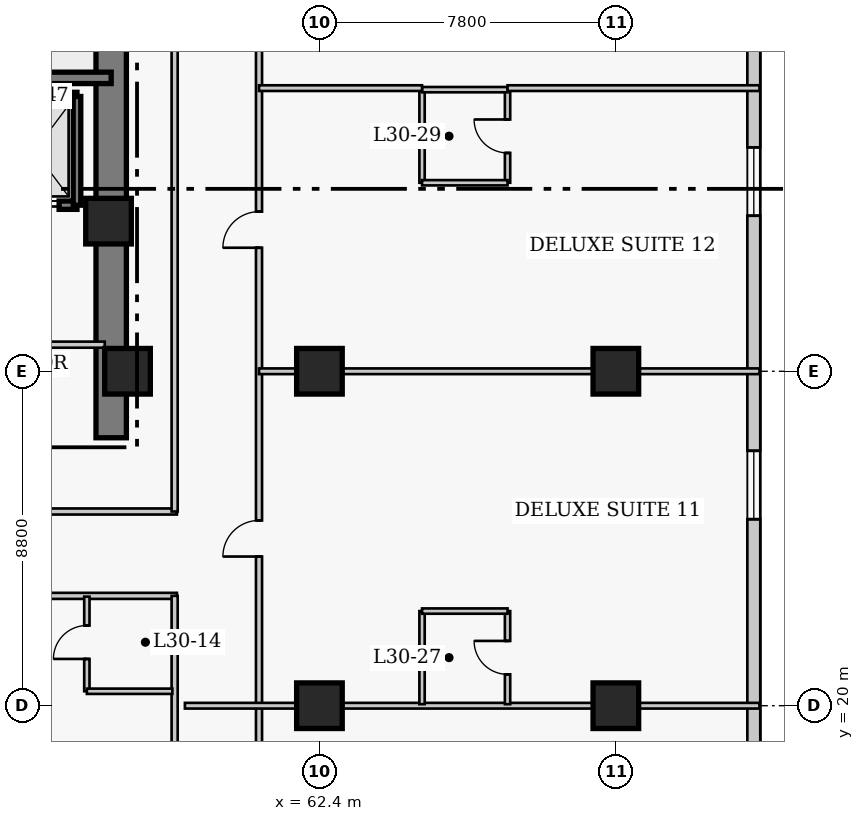
"""IFC4 building model, lengths in metres.
Left out: names, types, materials, properties, quantities, classifications, styles, units other than length and angle.
Written with IfcOpenShell. Run it as: python <this file> out.ifc"""

import sys

from ifc_helpers import new_model, si_unit, direction, frame, frame_2d, origin, origin_2d, place, context, subcontext, project, spatial, rectangle, extrude, element, fill, save


model = new_model("IFC4")
c1 = context("Model", 3, precision=1e-05, world=origin(), true_north=direction((0.0, 1.0)))
c2 = subcontext(c1, "Body", "Model", "MODEL_VIEW")
j1 = project(units=[si_unit("LENGTHUNIT", "METRE"), si_unit("PLANEANGLEUNIT", "RADIAN")], contexts=[c1])
p1 = place(None, origin())
s1 = spatial("IfcSite", under=j1, at=p1, CompositionType="ELEMENT")
p2 = place(p1, origin())
s2 = spatial("IfcBuilding", under=s1, at=p2, CompositionType="ELEMENT")
p3 = place(p2, frame((0.0, 0.0, 122.2)))
s3 = spatial("IfcBuildingStorey", under=s2, at=p3, CompositionType="ELEMENT", Elevation=122.2)
p4 = place(p3, frame((56.92, 27.05, 0.0), z_axis=(0.0, 0.0, 1.0), x_axis=(0.0, 1.0, 0.0)))
e1 = element("IfcWall", 1, at=p4, inside=s3, PredefinedType="SHEAR", context=c2, shape_type="SweptSolid", body=[
    extrude(rectangle(XDim=13.67, YDim=0.8, at=frame_2d((6.835, 0.0))), origin(), (0.0, 0.0, 1.0), 3.8),
])
p5 = place(p3, frame((48.45, 36.52, 0.0), z_axis=(0.0, 0.0, 1.0), x_axis=(1.0, 0.0, 0.0)))
e2 = element("IfcWall", 2, at=p5, inside=s3, PredefinedType="SHEAR", context=c2, shape_type="SweptSolid", body=[
    extrude(rectangle(XDim=8.47, YDim=0.3, at=frame_2d((4.235, 0.0))), origin(), (0.0, 0.0, 1.0), 3.8),
])
for number, where, z_axis, x_axis in (
    (3, (62.4, 20.0, 0.0), (0.0, 0.0, 1.0), (1.0, 0.0, 0.0)),
    (4, (62.4, 28.8, 0.0), (0.0, 0.0, 1.0), (1.0, 0.0, 0.0)),
    (5, (70.2, 20.0, 0.0), (0.0, 0.0, 1.0), (1.0, 0.0, 0.0)),
    (6, (70.2, 28.8, 0.0), (0.0, 0.0, 1.0), (1.0, 0.0, 0.0)),
    (7, (57.35, 28.8, 0.0), (0.0, 0.0, 1.0), (1.0, 0.0, 0.0)),
    (8, (56.85, 32.75, 0.0), (0.0, 0.0, 1.0), (1.0, 0.0, 0.0)),
):
    element("IfcColumn", number, at=place(p3, frame(where, z_axis=z_axis, x_axis=x_axis)), inside=s3, PredefinedType="COLUMN", context=c2, shape_type="SweptSolid", body=[
        extrude(rectangle(XDim=1.2, YDim=1.2, at=origin_2d()), origin(), (0.0, 0.0, 1.0), 3.8),
    ])
p6 = place(p3, frame((73.83, 13.83, 0.0), z_axis=(0.0, 0.0, 1.0), x_axis=(0.0, 1.0, 0.0)))
e9 = element("IfcWall", 9, at=p6, inside=s3, PredefinedType="SOLIDWALL", context=c2, shape_type="SweptSolid", body=[
    extrude(rectangle(XDim=31.94, YDim=0.34, at=frame_2d((15.97, 0.0))), origin(), (0.0, 0.0, 1.0), 3.54),
])
p7 = place(p6, frame((3.093, 0.0, 0.85)))
e10 = element("IfcOpeningElement", 10, at=p7, cuts=e9, PredefinedType="OPENING", context=c2, shape_type="SweptSolid", body=[
    extrude(rectangle(XDim=1.8, YDim=1.8, at=frame_2d((0.9, 0.9))), frame((0.0, 0.18, 0.0), z_axis=(0.0, -1.0, 0.0), x_axis=(1.0, 0.0, 0.0)), (0.0, 0.0, 1.0), 0.36),
])
p8 = place(p6, frame((11.077, 0.0, 0.85)))
e11 = element("IfcOpeningElement", 11, at=p8, cuts=e9, PredefinedType="OPENING", context=c2, shape_type="SweptSolid", body=[
    extrude(rectangle(XDim=1.8, YDim=1.8, at=frame_2d((0.9, 0.9))), frame((0.0, 0.18, 0.0), z_axis=(0.0, -1.0, 0.0), x_axis=(1.0, 0.0, 0.0)), (0.0, 0.0, 1.0), 0.36),
])
p9 = place(p6, frame((19.062, 0.0, 0.85)))
e12 = element("IfcOpeningElement", 12, at=p9, cuts=e9, PredefinedType="OPENING", context=c2, shape_type="SweptSolid", body=[
    extrude(rectangle(XDim=1.8, YDim=1.8, at=frame_2d((0.9, 0.9))), frame((0.0, 0.18, 0.0), z_axis=(0.0, -1.0, 0.0), x_axis=(1.0, 0.0, 0.0)), (0.0, 0.0, 1.0), 0.36),
])
p10 = place(p6, frame((27.048, 0.0, 0.85)))
e13 = element("IfcOpeningElement", 13, at=p10, cuts=e9, PredefinedType="OPENING", context=c2, shape_type="SweptSolid", body=[
    extrude(rectangle(XDim=1.8, YDim=1.8, at=frame_2d((0.9, 0.9))), frame((0.0, 0.18, 0.0), z_axis=(0.0, -1.0, 0.0), x_axis=(1.0, 0.0, 0.0)), (0.0, 0.0, 1.0), 0.36),
])
p11 = place(p3, frame((53.6, 36.03, 0.0), z_axis=(0.0, 0.0, 1.0), x_axis=(1.0, 0.0, 0.0)))
e14 = element("IfcWall", 14, at=p11, inside=s3, PredefinedType="SHEAR", context=c2, shape_type="SweptSolid", body=[
    extrude(rectangle(XDim=2.42, YDim=0.22, at=frame_2d((1.21, 0.0))), origin(), (0.0, 0.0, 1.0), 3.8),
])
p12 = place(p3, frame((53.6, 33.17, 0.0), z_axis=(0.0, 0.0, 1.0), x_axis=(1.0, 0.0, 0.0)))
e15 = element("IfcWall", 15, at=p12, inside=s3, PredefinedType="SHEAR", context=c2, shape_type="SweptSolid", body=[
    extrude(rectangle(XDim=2.42, YDim=0.22, at=frame_2d((1.21, 0.0))), origin(), (0.0, 0.0, 1.0), 3.8),
])
p13 = place(p12, frame((0.65, 0.0, 0.0)))
e16 = element("IfcOpeningElement", 16, at=p13, cuts=e15, PredefinedType="OPENING", context=c2, shape_type="SweptSolid", body=[
    extrude(rectangle(XDim=1.3, YDim=2.15, at=frame_2d((0.65, 1.075))), frame((0.0, 0.12, 0.0), z_axis=(0.0, -1.0, 0.0), x_axis=(1.0, 0.0, 0.0)), (0.0, 0.0, 1.0), 0.24),
])
p14 = place(p3, frame((56.02, 33.17, 0.0), z_axis=(0.0, 0.0, 1.0), x_axis=(0.0, 1.0, 0.0)))
e17 = element("IfcWall", 17, at=p14, inside=s3, PredefinedType="SHEAR", context=c2, shape_type="SweptSolid", body=[
    extrude(rectangle(XDim=2.86, YDim=0.2, at=frame_2d((1.43, 0.0))), origin(), (0.0, 0.0, 1.0), 3.8),
])
p15 = place(p3, frame((51.12, 29.5, 0.0), z_axis=(0.0, 0.0, 1.0), x_axis=(1.0, 0.0, 0.0)))
e18 = element("IfcWall", 18, at=p15, inside=s3, PredefinedType="PARTITIONING", context=c2, shape_type="SweptSolid", body=[
    extrude(rectangle(XDim=5.63, YDim=0.16, at=frame_2d((2.815, 0.0))), origin(), (0.0, 0.0, 1.0), 3.54),
])
p16 = place(p3, frame((35.85, 25.11, 0.0), z_axis=(0.0, 0.0, 1.0), x_axis=(1.0, 0.0, 0.0)))
e19 = element("IfcWall", 19, at=p16, inside=s3, PredefinedType="PARTITIONING", context=c2, shape_type="SweptSolid", body=[
    extrude(rectangle(XDim=22.8, YDim=0.16, at=frame_2d((11.4, 0.0))), origin(), (0.0, 0.0, 1.0), 3.54),
])
p17 = place(p3, frame((35.8, 22.89, 0.0), z_axis=(0.0, 0.0, 1.0), x_axis=(1.0, 0.0, 0.0)))
e20 = element("IfcWall", 20, at=p17, inside=s3, PredefinedType="PARTITIONING", context=c2, shape_type="SweptSolid", body=[
    extrude(rectangle(XDim=22.85, YDim=0.16, at=frame_2d((11.425, 0.0))), origin(), (0.0, 0.0, 1.0), 3.54),
])
p18 = place(p17, frame((0.924, 0.0, 0.0)))
e21 = element("IfcOpeningElement", 21, at=p18, cuts=e20, PredefinedType="OPENING", context=c2, shape_type="SweptSolid", body=[
    extrude(rectangle(XDim=0.95, YDim=2.1, at=frame_2d((0.475, 1.05))), frame((0.0, 0.09, 0.0), z_axis=(0.0, -1.0, 0.0), x_axis=(1.0, 0.0, 0.0)), (0.0, 0.0, 1.0), 0.18),
])
p19 = place(p17, frame((8.046, 0.0, 0.0)))
e22 = element("IfcOpeningElement", 22, at=p19, cuts=e20, PredefinedType="OPENING", context=c2, shape_type="SweptSolid", body=[
    extrude(rectangle(XDim=1.0, YDim=2.15, at=frame_2d((0.5, 1.075))), frame((0.0, 0.09, 0.0), z_axis=(0.0, -1.0, 0.0), x_axis=(1.0, 0.0, 0.0)), (0.0, 0.0, 1.0), 0.18),
])
p20 = place(p17, frame((12.614, 0.0, 0.0)))
e23 = element("IfcOpeningElement", 23, at=p20, cuts=e20, PredefinedType="OPENING", context=c2, shape_type="SweptSolid", body=[
    extrude(rectangle(XDim=0.95, YDim=2.1, at=frame_2d((0.475, 1.05))), frame((0.0, 0.09, 0.0), z_axis=(0.0, -1.0, 0.0), x_axis=(1.0, 0.0, 0.0)), (0.0, 0.0, 1.0), 0.18),
])
p21 = place(p17, frame((18.311, 0.0, 0.0)))
e24 = element("IfcOpeningElement", 24, at=p21, cuts=e20, PredefinedType="OPENING", context=c2, shape_type="SweptSolid", body=[
    extrude(rectangle(XDim=0.95, YDim=2.1, at=frame_2d((0.475, 1.05))), frame((0.0, 0.09, 0.0), z_axis=(0.0, -1.0, 0.0), x_axis=(1.0, 0.0, 0.0)), (0.0, 0.0, 1.0), 0.18),
])
p22 = place(p3, frame((60.81, 11.85, 0.0), z_axis=(0.0, 0.0, 1.0), x_axis=(0.0, 1.0, 0.0)))
e25 = element("IfcWall", 25, at=p22, inside=s3, PredefinedType="PARTITIONING", context=c2, shape_type="SweptSolid", body=[
    extrude(rectangle(XDim=28.8, YDim=0.16, at=frame_2d((14.4, 0.0))), origin(), (0.0, 0.0, 1.0), 3.54),
])
p23 = place(p22, frame((3.6, 0.0, 0.0)))
e26 = element("IfcOpeningElement", 26, at=p23, cuts=e25, PredefinedType="OPENING", context=c2, shape_type="SweptSolid", body=[
    extrude(rectangle(XDim=0.95, YDim=2.1, at=frame_2d((0.475, 1.05))), frame((0.0, 0.09, 0.0), z_axis=(0.0, -1.0, 0.0), x_axis=(1.0, 0.0, 0.0)), (0.0, 0.0, 1.0), 0.18),
])
p24 = place(p22, frame((12.075, 0.0, 0.0)))
e27 = element("IfcOpeningElement", 27, at=p24, cuts=e25, PredefinedType="OPENING", context=c2, shape_type="SweptSolid", body=[
    extrude(rectangle(XDim=0.95, YDim=2.1, at=frame_2d((0.475, 1.05))), frame((0.0, 0.09, 0.0), z_axis=(0.0, -1.0, 0.0), x_axis=(1.0, 0.0, 0.0)), (0.0, 0.0, 1.0), 0.18),
])
p25 = place(p22, frame((20.2, 0.0, 0.0)))
e28 = element("IfcOpeningElement", 28, at=p25, cuts=e25, PredefinedType="OPENING", context=c2, shape_type="SweptSolid", body=[
    extrude(rectangle(XDim=0.95, YDim=2.1, at=frame_2d((0.475, 1.05))), frame((0.0, 0.09, 0.0), z_axis=(0.0, -1.0, 0.0), x_axis=(1.0, 0.0, 0.0)), (0.0, 0.0, 1.0), 0.18),
])
p26 = place(p22, frame((27.36, 0.0, 0.0)))
e29 = element("IfcOpeningElement", 29, at=p26, cuts=e25, PredefinedType="OPENING", context=c2, shape_type="SweptSolid", body=[
    extrude(rectangle(XDim=1.0, YDim=2.15, at=frame_2d((0.5, 1.075))), frame((0.0, 0.09, 0.0), z_axis=(0.0, -1.0, 0.0), x_axis=(1.0, 0.0, 0.0)), (0.0, 0.0, 1.0), 0.18),
])
p27 = place(p3, frame((58.59, 25.11, 0.0), z_axis=(0.0, 0.0, 1.0), x_axis=(0.0, 1.0, 0.0)))
e30 = element("IfcWall", 30, at=p27, inside=s3, PredefinedType="PARTITIONING", context=c2, shape_type="SweptSolid", body=[
    extrude(rectangle(XDim=15.54, YDim=0.16, at=frame_2d((7.77, 0.0))), origin(), (0.0, 0.0, 1.0), 3.54),
])
p28 = place(p3, frame((58.59, 11.85, 0.0), z_axis=(0.0, 0.0, 1.0), x_axis=(0.0, 1.0, 0.0)))
e31 = element("IfcWall", 31, at=p28, inside=s3, PredefinedType="PARTITIONING", context=c2, shape_type="SweptSolid", body=[
    extrude(rectangle(XDim=11.04, YDim=0.16, at=frame_2d((5.52, 0.0))), origin(), (0.0, 0.0, 1.0), 3.083),
])
p29 = place(p3, frame((56.28, 20.38, 0.0), z_axis=(0.0, 0.0, 1.0), x_axis=(0.0, 1.0, 0.0)))
e32 = element("IfcWall", 32, at=p29, inside=s3, PredefinedType="PLUMBINGWALL", context=c2, shape_type="SweptSolid", body=[
    extrude(rectangle(XDim=2.49, YDim=0.14, at=frame_2d((1.245, 0.0))), origin(), (0.0, 0.0, 1.0), 3.54),
])
p30 = place(p29, frame((0.851, 0.0, 0.0)))
e33 = element("IfcOpeningElement", 33, at=p30, cuts=e32, PredefinedType="OPENING", context=c2, shape_type="SweptSolid", body=[
    extrude(rectangle(XDim=0.88, YDim=2.05, at=frame_2d((0.44, 1.025))), frame((0.0, 0.08, 0.0), z_axis=(0.0, -1.0, 0.0), x_axis=(1.0, 0.0, 0.0)), (0.0, 0.0, 1.0), 0.16),
])
p31 = place(p3, frame((56.28, 20.38, 0.0), z_axis=(0.0, 0.0, 1.0), x_axis=(1.0, 0.0, 0.0)))
e34 = element("IfcWall", 34, at=p31, inside=s3, PredefinedType="PLUMBINGWALL", context=c2, shape_type="SweptSolid", body=[
    extrude(rectangle(XDim=2.25, YDim=0.14, at=frame_2d((1.125, 0.0))), origin(), (0.0, 0.0, 1.0), 3.54),
])
p32 = place(p3, frame((58.86, 20.0, 0.0), z_axis=(0.0, 0.0, 1.0), x_axis=(1.0, 0.0, 0.0)))
e35 = element("IfcWall", 35, at=p32, inside=s3, PredefinedType="PARTITIONING", context=c2, shape_type="SweptSolid", body=[
    extrude(rectangle(XDim=15.12, YDim=0.15, at=frame_2d((7.56, 0.0))), origin(), (0.0, 0.0, 1.0), 2.679),
])
p33 = place(p3, frame((65.1, 20.04, 0.0), z_axis=(0.0, 0.0, 1.0), x_axis=(0.0, 1.0, 0.0)))
e36 = element("IfcWall", 36, at=p33, inside=s3, PredefinedType="PLUMBINGWALL", context=c2, shape_type="SweptSolid", body=[
    extrude(rectangle(XDim=2.45, YDim=0.14, at=frame_2d((1.225, 0.0))), origin(), (0.0, 0.0, 1.0), 3.54),
])
p34 = place(p3, frame((67.35, 20.04, 0.0), z_axis=(0.0, 0.0, 1.0), x_axis=(0.0, 1.0, 0.0)))
e37 = element("IfcWall", 37, at=p34, inside=s3, PredefinedType="PLUMBINGWALL", context=c2, shape_type="SweptSolid", body=[
    extrude(rectangle(XDim=2.45, YDim=0.14, at=frame_2d((1.225, 0.0))), origin(), (0.0, 0.0, 1.0), 3.54),
])
p35 = place(p34, frame((0.785, 0.0, 0.0)))
e38 = element("IfcOpeningElement", 38, at=p35, cuts=e37, PredefinedType="OPENING", context=c2, shape_type="SweptSolid", body=[
    extrude(rectangle(XDim=0.88, YDim=2.05, at=frame_2d((0.44, 1.025))), frame((0.0, 0.08, 0.0), z_axis=(0.0, -1.0, 0.0), x_axis=(1.0, 0.0, 0.0)), (0.0, 0.0, 1.0), 0.16),
])
p36 = place(p3, frame((65.1, 22.49, 0.0), z_axis=(0.0, 0.0, 1.0), x_axis=(1.0, 0.0, 0.0)))
e39 = element("IfcWall", 39, at=p36, inside=s3, PredefinedType="PLUMBINGWALL", context=c2, shape_type="SweptSolid", body=[
    extrude(rectangle(XDim=2.25, YDim=0.14, at=frame_2d((1.125, 0.0))), origin(), (0.0, 0.0, 1.0), 3.54),
])
p37 = place(p3, frame((60.81, 28.8, 0.0), z_axis=(0.0, 0.0, 1.0), x_axis=(1.0, 0.0, 0.0)))
e40 = element("IfcWall", 40, at=p37, inside=s3, PredefinedType="PARTITIONING", context=c2, shape_type="SweptSolid", body=[
    extrude(rectangle(XDim=13.17, YDim=0.15, at=frame_2d((6.585, 0.0))), origin(), (0.0, 0.0, 1.0), 2.679),
])
p38 = place(p3, frame((65.1, 33.76, 0.0), z_axis=(0.0, 0.0, 1.0), x_axis=(0.0, 1.0, 0.0)))
e41 = element("IfcWall", 41, at=p38, inside=s3, PredefinedType="PLUMBINGWALL", context=c2, shape_type="SweptSolid", body=[
    extrude(rectangle(XDim=2.45, YDim=0.14, at=frame_2d((1.225, 0.0))), origin(), (0.0, 0.0, 1.0), 3.54),
])
p39 = place(p3, frame((67.35, 33.76, 0.0), z_axis=(0.0, 0.0, 1.0), x_axis=(0.0, 1.0, 0.0)))
e42 = element("IfcWall", 42, at=p39, inside=s3, PredefinedType="PLUMBINGWALL", context=c2, shape_type="SweptSolid", body=[
    extrude(rectangle(XDim=2.45, YDim=0.14, at=frame_2d((1.225, 0.0))), origin(), (0.0, 0.0, 1.0), 3.54),
])
p40 = place(p39, frame((0.785, 0.0, 0.0)))
e43 = element("IfcOpeningElement", 43, at=p40, cuts=e42, PredefinedType="OPENING", context=c2, shape_type="SweptSolid", body=[
    extrude(rectangle(XDim=0.88, YDim=2.05, at=frame_2d((0.44, 1.025))), frame((0.0, 0.08, 0.0), z_axis=(0.0, -1.0, 0.0), x_axis=(1.0, 0.0, 0.0)), (0.0, 0.0, 1.0), 0.16),
])
for number, where, z_axis, x_axis in (
    (44, (65.1, 33.76, 0.0), (0.0, 0.0, 1.0), (1.0, 0.0, 0.0)),
    (45, (65.1, 36.21, 0.0), (0.0, 0.0, 1.0), (1.0, 0.0, 0.0)),
):
    element("IfcWall", number, at=place(p3, frame(where, z_axis=z_axis, x_axis=x_axis)), inside=s3, PredefinedType="PLUMBINGWALL", context=c2, shape_type="SweptSolid", body=[
        extrude(rectangle(XDim=2.25, YDim=0.14, at=frame_2d((1.125, 0.0))), origin(), (0.0, 0.0, 1.0), 3.54),
    ])
p41 = place(p3, frame((60.81, 36.25, 0.0), z_axis=(0.0, 0.0, 1.0), x_axis=(1.0, 0.0, 0.0)))
e46 = element("IfcWall", 46, at=p41, inside=s3, PredefinedType="PARTITIONING", context=c2, shape_type="SweptSolid", body=[
    extrude(rectangle(XDim=4.29, YDim=0.15, at=frame_2d((2.145, 0.0))), origin(), (0.0, 0.0, 1.0), 3.54),
])
p42 = place(p3, frame((67.35, 36.25, 0.0), z_axis=(0.0, 0.0, 1.0), x_axis=(1.0, 0.0, 0.0)))
e47 = element("IfcWall", 47, at=p42, inside=s3, PredefinedType="PARTITIONING", context=c2, shape_type="SweptSolid", body=[
    extrude(rectangle(XDim=6.63, YDim=0.15, at=frame_2d((3.315, 0.0))), origin(), (0.0, 0.0, 1.0), 3.54),
])
p43 = place(p8, origin())
e48 = element("IfcWindow", 48, at=p43, inside=s3, PartitioningType="SINGLE_PANEL", PredefinedType="WINDOW", context=c2, shape_type="SweptSolid", body=[
    extrude(rectangle(XDim=1.8, YDim=1.8, at=frame_2d((0.9, 0.9))), frame((0.0, 0.03, 0.0), z_axis=(0.0, -1.0, 0.0), x_axis=(1.0, 0.0, 0.0)), (0.0, 0.0, 1.0), 0.06),
])
fill(e11, e48)
p44 = place(p9, origin())
e49 = element("IfcWindow", 49, at=p44, inside=s3, PartitioningType="SINGLE_PANEL", PredefinedType="WINDOW", context=c2, shape_type="SweptSolid", body=[
    extrude(rectangle(XDim=1.8, YDim=1.8, at=frame_2d((0.9, 0.9))), frame((0.0, 0.03, 0.0), z_axis=(0.0, -1.0, 0.0), x_axis=(1.0, 0.0, 0.0)), (0.0, 0.0, 1.0), 0.06),
])
fill(e12, e49)
p45 = place(p13, origin())
e50 = element("IfcDoor", 50, at=p45, inside=s3, OperationType="DOUBLE_DOOR_SLIDING", PredefinedType="DOOR", context=c2, shape_type="SweptSolid", body=[
    extrude(rectangle(XDim=1.3, YDim=2.15, at=frame_2d((0.65, 1.075))), frame((0.0, 0.025, 0.0), z_axis=(0.0, -1.0, 0.0), x_axis=(1.0, 0.0, 0.0)), (0.0, 0.0, 1.0), 0.05),
])
fill(e16, e50)
p46 = place(p30, origin())
e51 = element("IfcDoor", 51, at=p46, inside=s3, OperationType="SINGLE_SWING_LEFT", PredefinedType="DOOR", context=c2, shape_type="SweptSolid", body=[
    extrude(rectangle(XDim=0.88, YDim=2.05, at=frame_2d((0.44, 1.025))), frame((0.0, 0.025, 0.0), z_axis=(0.0, -1.0, 0.0), x_axis=(1.0, 0.0, 0.0)), (0.0, 0.0, 1.0), 0.05),
])
fill(e33, e51)
p47 = place(p35, origin())
e52 = element("IfcDoor", 52, at=p47, inside=s3, OperationType="SINGLE_SWING_RIGHT", PredefinedType="DOOR", context=c2, shape_type="SweptSolid", body=[
    extrude(rectangle(XDim=0.88, YDim=2.05, at=frame_2d((0.44, 1.025))), frame((0.0, 0.025, 0.0), z_axis=(0.0, -1.0, 0.0), x_axis=(1.0, 0.0, 0.0)), (0.0, 0.0, 1.0), 0.05),
])
fill(e38, e52)
p48 = place(p24, origin())
e53 = element("IfcDoor", 53, at=p48, inside=s3, OperationType="SINGLE_SWING_LEFT", PredefinedType="DOOR", context=c2, shape_type="SweptSolid", body=[
    extrude(rectangle(XDim=0.95, YDim=2.1, at=frame_2d((0.475, 1.05))), frame((0.0, 0.025, 0.0), z_axis=(0.0, -1.0, 0.0), x_axis=(1.0, 0.0, 0.0)), (0.0, 0.0, 1.0), 0.05),
])
fill(e27, e53)
p49 = place(p40, origin())
e54 = element("IfcDoor", 54, at=p49, inside=s3, OperationType="SINGLE_SWING_RIGHT", PredefinedType="DOOR", context=c2, shape_type="SweptSolid", body=[
    extrude(rectangle(XDim=0.88, YDim=2.05, at=frame_2d((0.44, 1.025))), frame((0.0, 0.025, 0.0), z_axis=(0.0, -1.0, 0.0), x_axis=(1.0, 0.0, 0.0)), (0.0, 0.0, 1.0), 0.05),
])
fill(e43, e54)
p50 = place(p25, origin())
e55 = element("IfcDoor", 55, at=p50, inside=s3, OperationType="SINGLE_SWING_LEFT", PredefinedType="DOOR", context=c2, shape_type="SweptSolid", body=[
    extrude(rectangle(XDim=0.95, YDim=2.1, at=frame_2d((0.475, 1.05))), frame((0.0, 0.025, 0.0), z_axis=(0.0, -1.0, 0.0), x_axis=(1.0, 0.0, 0.0)), (0.0, 0.0, 1.0), 0.05),
])
fill(e28, e55)
save(model, sys.argv[1])
